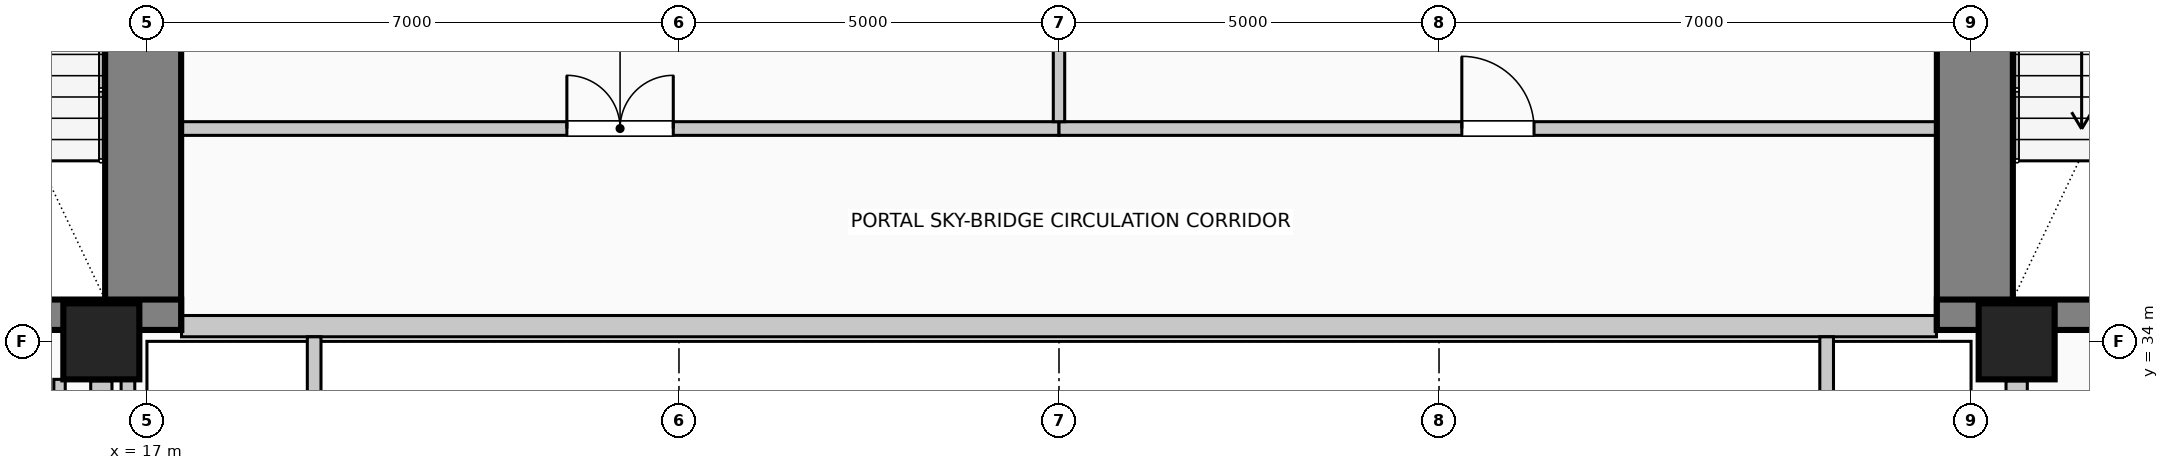
"""IFC4 building model, lengths in metres.
Left out: names, types, materials, properties, quantities, classifications, styles, units other than length and angle.
Written with IfcOpenShell. Run it as: python <this file> out.ifc"""

import sys

from ifc_helpers import new_model, si_unit, direction, frame, frame_2d, origin, origin_2d, place, context, subcontext, project, spatial, rectangle, circle, extrude, element, fill, save


model = new_model("IFC4")
c1 = context("Model", 3, precision=1e-05, world=origin(), true_north=direction((0.0, 1.0)))
c2 = subcontext(c1, "Body", "Model", "MODEL_VIEW")
j1 = project(units=[si_unit("LENGTHUNIT", "METRE"), si_unit("PLANEANGLEUNIT", "RADIAN")], contexts=[c1])
p1 = place(None, origin())
s1 = spatial("IfcSite", under=j1, at=p1, CompositionType="ELEMENT")
p2 = place(p1, origin())
s2 = spatial("IfcBuilding", under=s1, at=p2, CompositionType="ELEMENT")
p3 = place(p2, frame((0.0, 0.0, 42.6)))
s3 = spatial("IfcBuildingStorey", under=s2, at=p3, CompositionType="ELEMENT", Elevation=42.6)
p4 = place(p3, frame((16.95, 34.15, 0.0), z_axis=(0.0, 0.0, 1.0), x_axis=(0.0, 1.0, 0.0)))
e1 = element("IfcWall", 1, at=p4, inside=s3, PredefinedType="SHEAR", context=c2, shape_type="SweptSolid", body=[
    extrude(rectangle(XDim=9.28, YDim=1.0, at=frame_2d((4.64, 0.0))), origin(), (0.0, 0.0, 1.0), 4.0),
])
p5 = place(p3, frame((12.29, 34.35, 0.0), z_axis=(0.0, 0.0, 1.0), x_axis=(1.0, 0.0, 0.0)))
e2 = element("IfcWall", 2, at=p5, inside=s3, PredefinedType="SHEAR", context=c2, shape_type="SweptSolid", body=[
    extrude(rectangle(XDim=5.16, YDim=0.4, at=frame_2d((2.58, 0.0))), origin(), (0.0, 0.0, 1.0), 4.0),
])
p6 = place(p5, frame((1.4, 0.0, 0.0)))
e3 = element("IfcOpeningElement", 3, at=p6, cuts=e2, PredefinedType="OPENING", context=c2, shape_type="SweptSolid", body=[
    extrude(rectangle(XDim=1.15, YDim=2.2, at=frame_2d((0.575, 1.1))), frame((0.0, 0.21, 0.0), z_axis=(0.0, -1.0, 0.0), x_axis=(1.0, 0.0, 0.0)), (0.0, 0.0, 1.0), 0.42),
])
p7 = place(p3, frame((41.05, 34.15, 0.0), z_axis=(0.0, 0.0, 1.0), x_axis=(0.0, 1.0, 0.0)))
e4 = element("IfcWall", 4, at=p7, inside=s3, PredefinedType="SHEAR", context=c2, shape_type="SweptSolid", body=[
    extrude(rectangle(XDim=9.28, YDim=1.0, at=frame_2d((4.64, 0.0))), origin(), (0.0, 0.0, 1.0), 4.0),
])
p8 = place(p3, frame((40.55, 34.35, 0.0), z_axis=(0.0, 0.0, 1.0), x_axis=(1.0, 0.0, 0.0)))
e5 = element("IfcWall", 5, at=p8, inside=s3, PredefinedType="SHEAR", context=c2, shape_type="SweptSolid", body=[
    extrude(rectangle(XDim=5.16, YDim=0.4, at=frame_2d((2.58, 0.0))), origin(), (0.0, 0.0, 1.0), 4.0),
])
p9 = place(p8, frame((2.4, 0.0, 0.0)))
e6 = element("IfcOpeningElement", 6, at=p9, cuts=e5, PredefinedType="OPENING", context=c2, shape_type="SweptSolid", body=[
    extrude(rectangle(XDim=1.15, YDim=2.2, at=frame_2d((0.575, 1.1))), frame((0.0, 0.21, 0.0), z_axis=(0.0, -1.0, 0.0), x_axis=(1.0, 0.0, 0.0)), (0.0, 0.0, 1.0), 0.42),
])
for number, where, z_axis, x_axis in (
    (7, (16.4, 34.0, 0.0), (0.0, 0.0, 1.0), (1.0, 0.0, 0.0)),
    (8, (41.6, 34.0, 0.0), (0.0, 0.0, 1.0), (1.0, 0.0, 0.0)),
):
    element("IfcColumn", number, at=place(p3, frame(where, z_axis=z_axis, x_axis=x_axis)), inside=s3, PredefinedType="COLUMN", context=c2, shape_type="SweptSolid", body=[
        extrude(circle(Radius=0.5, at=origin_2d()), origin(), (0.0, 0.0, 1.0), 4.0),
    ])
for number, where, z_axis, x_axis in (
    (9, (16.4, 33.48, 0.0), (0.0, 0.0, 1.0), (0.0, -1.0, 0.0)),
    (10, (41.6, 26.77, 0.0), (0.0, 0.0, 1.0), (0.0, 1.0, 0.0)),
):
    element("IfcWall", number, at=place(p3, frame(where, z_axis=z_axis, x_axis=x_axis)), inside=s3, PredefinedType="SOLIDWALL", context=c2, shape_type="SweptSolid", body=[
        extrude(rectangle(XDim=6.71, YDim=0.28, at=frame_2d((3.355, 0.0))), origin(), (0.0, 0.0, 1.0), 3.0),
    ])
p10 = place(p3, frame((40.545, 34.2, 0.0), z_axis=(0.0, 0.0, 1.0), x_axis=(-1.0, 0.0, 0.0)))
e11 = element("IfcWall", 11, at=p10, inside=s3, PredefinedType="SOLIDWALL", context=c2, shape_type="SweptSolid", body=[
    extrude(rectangle(XDim=23.09, YDim=0.28, at=frame_2d((11.545, 0.0))), origin(), (0.0, 0.0, 1.0), 0.7),
])
p11 = place(p3, frame((17.45, 36.8, 0.0), z_axis=(0.0, 0.0, 1.0), x_axis=(1.0, 0.0, 0.0)))
e12 = element("IfcWall", 12, at=p11, inside=s3, PredefinedType="PARTITIONING", context=c2, shape_type="SweptSolid", body=[
    extrude(rectangle(XDim=11.55, YDim=0.18, at=frame_2d((5.775, 0.0))), origin(), (0.0, 0.0, 1.0), 3.7),
])
p12 = place(p11, frame((5.075, 0.0, 0.0)))
e13 = element("IfcOpeningElement", 13, at=p12, cuts=e12, PredefinedType="OPENING", context=c2, shape_type="SweptSolid", body=[
    extrude(rectangle(XDim=1.4, YDim=2.2, at=frame_2d((0.7, 1.1))), frame((0.0, 0.1, 0.0), z_axis=(0.0, -1.0, 0.0), x_axis=(1.0, 0.0, 0.0)), (0.0, 0.0, 1.0), 0.2),
])
p13 = place(p3, frame((29.0, 36.8, 0.0), z_axis=(0.0, 0.0, 1.0), x_axis=(1.0, 0.0, 0.0)))
e14 = element("IfcWall", 14, at=p13, inside=s3, PredefinedType="PARTITIONING", context=c2, shape_type="SweptSolid", body=[
    extrude(rectangle(XDim=11.55, YDim=0.18, at=frame_2d((5.775, 0.0))), origin(), (0.0, 0.0, 1.0), 3.7),
])
p14 = place(p13, frame((5.3, 0.0, 0.0)))
e15 = element("IfcOpeningElement", 15, at=p14, cuts=e14, PredefinedType="OPENING", context=c2, shape_type="SweptSolid", body=[
    extrude(rectangle(XDim=0.95, YDim=2.15, at=frame_2d((0.475, 1.075))), frame((0.0, 0.1, 0.0), z_axis=(0.0, -1.0, 0.0), x_axis=(1.0, 0.0, 0.0)), (0.0, 0.0, 1.0), 0.2),
])
p15 = place(p3, frame((15.85, 32.47, 0.0), z_axis=(0.0, 0.0, 1.0), x_axis=(0.0, 1.0, 0.0)))
e16 = element("IfcWall", 16, at=p15, inside=s3, PredefinedType="PARTITIONING", context=c2, shape_type="SweptSolid", body=[
    extrude(rectangle(XDim=1.03, YDim=0.15, at=frame_2d((0.515, 0.0))), origin(), (0.0, 0.0, 1.0), 3.7),
])
p16 = place(p3, frame((16.75, 32.44, 0.0), z_axis=(0.0, 0.0, 1.0), x_axis=(0.0, 1.0, 0.0)))
e17 = element("IfcWall", 17, at=p16, inside=s3, PredefinedType="PARTITIONING", context=c2, shape_type="SweptSolid", body=[
    extrude(rectangle(XDim=1.06, YDim=0.18, at=frame_2d((0.53, 0.0))), origin(), (0.0, 0.0, 1.0), 3.7),
])
p17 = place(p3, frame((19.2, 32.44, 0.0), z_axis=(0.0, 0.0, 1.0), x_axis=(0.0, 1.0, 0.0)))
e18 = element("IfcWall", 18, at=p17, inside=s3, PredefinedType="PARTITIONING", context=c2, shape_type="SweptSolid", body=[
    extrude(rectangle(XDim=1.62, YDim=0.18, at=frame_2d((0.81, 0.0))), origin(), (0.0, 0.0, 1.0), 3.7),
])
p18 = place(p3, frame((29.0, 36.89, 0.0), z_axis=(0.0, 0.0, 1.0), x_axis=(0.0, 1.0, 0.0)))
e19 = element("IfcWall", 19, at=p18, inside=s3, PredefinedType="PARTITIONING", context=c2, shape_type="SweptSolid", body=[
    extrude(rectangle(XDim=8.37, YDim=0.15, at=frame_2d((4.185, 0.0))), origin(), (0.0, 0.0, 1.0), 3.7),
])
p19 = place(p3, frame((39.1, 32.44, 0.0), z_axis=(0.0, 0.0, 1.0), x_axis=(0.0, 1.0, 0.0)))
e20 = element("IfcWall", 20, at=p19, inside=s3, PredefinedType="PARTITIONING", context=c2, shape_type="SweptSolid", body=[
    extrude(rectangle(XDim=1.62, YDim=0.18, at=frame_2d((0.81, 0.0))), origin(), (0.0, 0.0, 1.0), 3.7),
])
p20 = place(p12, origin())
e21 = element("IfcDoor", 21, at=p20, inside=s3, OperationType="DOUBLE_DOOR_SINGLE_SWING", PredefinedType="DOOR", context=c2, shape_type="SweptSolid", body=[
    extrude(rectangle(XDim=1.4, YDim=2.2, at=frame_2d((0.7, 1.1))), frame((0.0, 0.025, 0.0), z_axis=(0.0, -1.0, 0.0), x_axis=(1.0, 0.0, 0.0)), (0.0, 0.0, 1.0), 0.05),
])
fill(e13, e21)
p21 = place(p14, origin())
e22 = element("IfcDoor", 22, at=p21, inside=s3, OperationType="SINGLE_SWING_LEFT", PredefinedType="DOOR", context=c2, shape_type="SweptSolid", body=[
    extrude(rectangle(XDim=0.95, YDim=2.15, at=frame_2d((0.475, 1.075))), frame((0.0, 0.025, 0.0), z_axis=(0.0, -1.0, 0.0), x_axis=(1.0, 0.0, 0.0)), (0.0, 0.0, 1.0), 0.05),
])
fill(e15, e22)
save(model, sys.argv[1])
